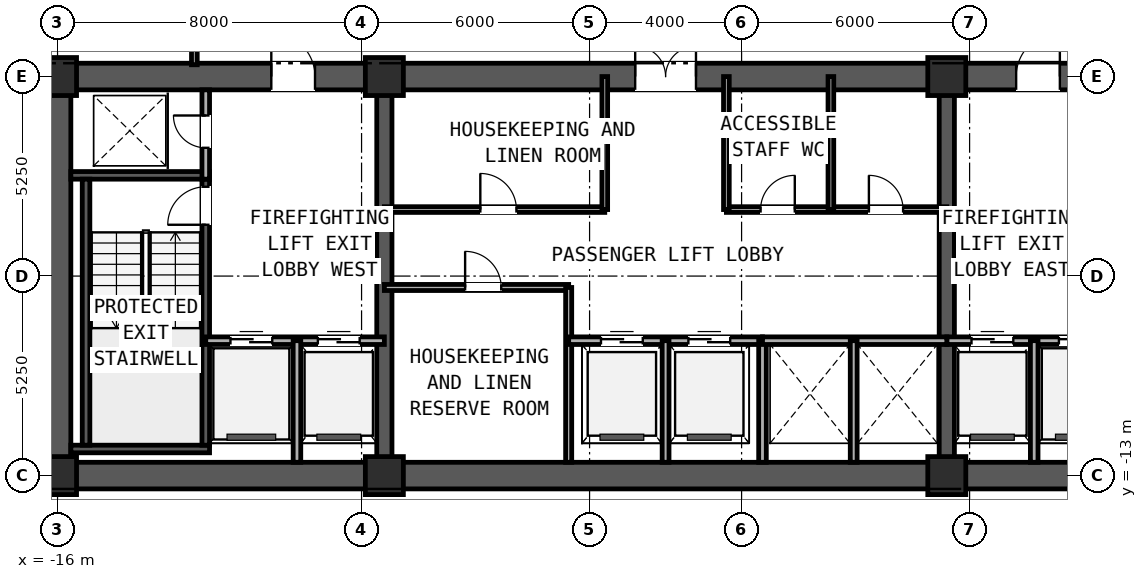
"""IFC4 building model, lengths in metres.
Left out: names, types, materials, properties, quantities, classifications, styles, units other than length and angle.
Written with IfcOpenShell. Run it as: python <this file> out.ifc"""

import sys

from ifc_helpers import new_model, si_unit, direction, frame, frame_2d, origin, origin_2d, place, context, subcontext, project, spatial, rectangle, extrude, element, fill, save


model = new_model("IFC4")
c1 = context("Model", 3, precision=1e-05, world=origin(), true_north=direction((0.0, 1.0)))
c2 = subcontext(c1, "Body", "Model", "MODEL_VIEW")
j1 = project(units=[si_unit("LENGTHUNIT", "METRE"), si_unit("PLANEANGLEUNIT", "RADIAN")], contexts=[c1])
p1 = place(None, origin())
s1 = spatial("IfcSite", under=j1, at=p1, CompositionType="ELEMENT")
p2 = place(p1, origin())
s2 = spatial("IfcBuilding", under=s1, at=p2, CompositionType="ELEMENT")
p3 = place(p2, frame((0.0, 0.0, 139.35)))
s3 = spatial("IfcBuildingStorey", under=s2, at=p3, CompositionType="ELEMENT", Elevation=139.35)
p4 = place(p3, frame((-16.35, -13.0, 0.0), z_axis=(0.0, 0.0, 1.0), x_axis=(1.0, 0.0, 0.0)))
e1 = element("IfcWall", 1, at=p4, inside=s3, PredefinedType="SHEAR", context=c2, shape_type="SweptSolid", body=[
    extrude(rectangle(XDim=32.7, YDim=0.7, at=frame_2d((16.35, 0.0))), origin(), (0.0, 0.0, 1.0), 2.91),
])
p5 = place(p3, frame((-16.35, -2.5, 0.0), z_axis=(0.0, 0.0, 1.0), x_axis=(1.0, 0.0, 0.0)))
e2 = element("IfcWall", 2, at=p5, inside=s3, PredefinedType="SHEAR", context=c2, shape_type="SweptSolid", body=[
    extrude(rectangle(XDim=32.7, YDim=0.7, at=frame_2d((16.35, 0.0))), origin(), (0.0, 0.0, 1.0), 2.91),
])
p6 = place(p5, frame((5.975, 0.0, 0.0)))
e3 = element("IfcOpeningElement", 3, at=p6, cuts=e2, PredefinedType="OPENING", context=c2, shape_type="SweptSolid", body=[
    extrude(rectangle(XDim=1.15, YDim=2.0, at=frame_2d((0.575, 1.0))), frame((0.0, 0.36, 0.0), z_axis=(0.0, -1.0, 0.0), x_axis=(1.0, 0.0, 0.0)), (0.0, 0.0, 1.0), 0.72),
])
p7 = place(p5, frame((15.55, 0.0, 0.0)))
e4 = element("IfcOpeningElement", 4, at=p7, cuts=e2, PredefinedType="OPENING", context=c2, shape_type="SweptSolid", body=[
    extrude(rectangle(XDim=1.6, YDim=2.0, at=frame_2d((0.8, 1.0))), frame((0.0, 0.36, 0.0), z_axis=(0.0, -1.0, 0.0), x_axis=(1.0, 0.0, 0.0)), (0.0, 0.0, 1.0), 0.72),
])
p8 = place(p5, frame((25.575, 0.0, 0.0)))
e5 = element("IfcOpeningElement", 5, at=p8, cuts=e2, PredefinedType="OPENING", context=c2, shape_type="SweptSolid", body=[
    extrude(rectangle(XDim=1.15, YDim=2.0, at=frame_2d((0.575, 1.0))), frame((0.0, 0.36, 0.0), z_axis=(0.0, -1.0, 0.0), x_axis=(1.0, 0.0, 0.0)), (0.0, 0.0, 1.0), 0.72),
])
p9 = place(p3, frame((-16.0, -12.65, 0.0), z_axis=(0.0, 0.0, 1.0), x_axis=(0.0, 1.0, 0.0)))
e6 = element("IfcWall", 6, at=p9, inside=s3, PredefinedType="SHEAR", context=c2, shape_type="SweptSolid", body=[
    extrude(rectangle(XDim=9.8, YDim=0.7, at=frame_2d((4.9, 0.0))), origin(), (0.0, 0.0, 1.0), 2.91),
])
for number, where, z_axis, x_axis in (
    (7, (-7.4, -12.65, 0.0), (0.0, 0.0, 1.0), (0.0, 1.0, 0.0)),
    (8, (7.4, -12.65, 0.0), (0.0, 0.0, 1.0), (0.0, 1.0, 0.0)),
):
    element("IfcWall", number, at=place(p3, frame(where, z_axis=z_axis, x_axis=x_axis)), inside=s3, PredefinedType="SHEAR", context=c2, shape_type="SweptSolid", body=[
        extrude(rectangle(XDim=9.8, YDim=0.4, at=frame_2d((4.9, 0.0))), origin(), (0.0, 0.0, 1.0), 3.19),
    ])
for number, where, z_axis, x_axis in (
    (9, (-15.65, -12.3, 0.0), (0.0, 0.0, 1.0), (1.0, 0.0, 0.0)),
    (10, (-15.65, -5.1, 0.0), (0.0, 0.0, 1.0), (1.0, 0.0, 0.0)),
):
    element("IfcWall", number, at=place(p3, frame(where, z_axis=z_axis, x_axis=x_axis)), inside=s3, PredefinedType="SOLIDWALL", context=c2, shape_type="SweptSolid", body=[
        extrude(rectangle(XDim=3.65, YDim=0.2, at=frame_2d((1.825, 0.0))), origin(), (0.0, 0.0, 1.0), 3.19),
    ])
p10 = place(p3, frame((-15.25, -12.2, 0.0), z_axis=(0.0, 0.0, 1.0), x_axis=(0.0, 1.0, 0.0)))
e11 = element("IfcWall", 11, at=p10, inside=s3, PredefinedType="SOLIDWALL", context=c2, shape_type="SweptSolid", body=[
    extrude(rectangle(XDim=7.0, YDim=0.2, at=frame_2d((3.5, 0.0))), origin(), (0.0, 0.0, 1.0), 3.19),
])
p11 = place(p3, frame((-12.1, -12.2, 0.0), z_axis=(0.0, 0.0, 1.0), x_axis=(0.0, 1.0, 0.0)))
e12 = element("IfcWall", 12, at=p11, inside=s3, PredefinedType="SOLIDWALL", context=c2, shape_type="SweptSolid", body=[
    extrude(rectangle(XDim=7.0, YDim=0.2, at=frame_2d((3.5, 0.0))), origin(), (0.0, 0.0, 1.0), 3.19),
])
p12 = place(p11, frame((5.8, 0.0, 0.0)))
e13 = element("IfcOpeningElement", 13, at=p12, cuts=e12, PredefinedType="OPENING", context=c2, shape_type="SweptSolid", body=[
    extrude(rectangle(XDim=1.0, YDim=2.1, at=frame_2d((0.5, 1.05))), frame((0.0, 0.11, 0.0), z_axis=(0.0, -1.0, 0.0), x_axis=(1.0, 0.0, 0.0)), (0.0, 0.0, 1.0), 0.22),
])
for number, where, z_axis, x_axis in (
    (14, (-16.0, -13.0, 0.0), (0.0, 0.0, 1.0), (1.0, 0.0, 0.0)),
    (15, (-7.4, -13.0, 0.0), (0.0, 0.0, 1.0), (1.0, 0.0, 0.0)),
    (16, (7.4, -13.0, 0.0), (0.0, 0.0, 1.0), (1.0, 0.0, 0.0)),
    (17, (-16.0, -2.5, 0.0), (0.0, 0.0, 1.0), (1.0, 0.0, 0.0)),
    (18, (-7.4, -2.5, 0.0), (0.0, 0.0, 1.0), (1.0, 0.0, 0.0)),
    (19, (7.4, -2.5, 0.0), (0.0, 0.0, 1.0), (1.0, 0.0, 0.0)),
):
    element("IfcColumn", number, at=place(p3, frame(where, z_axis=z_axis, x_axis=x_axis)), inside=s3, PredefinedType="COLUMN", context=c2, shape_type="SweptSolid", body=[
        extrude(rectangle(XDim=1.0, YDim=1.0, at=origin_2d()), origin(), (0.0, 0.0, 1.0), 3.45),
    ])
p13 = place(p3, frame((-26.695, -13.016, 0.0), z_axis=(0.0, 0.0, 1.0), x_axis=(0.995396268366, -0.095845025554, 0.0)))
e20 = element("IfcWall", 20, at=p13, inside=s3, PredefinedType="STANDARD", context=c2, shape_type="SweptSolid", body=[
    extrude(rectangle(XDim=49.6, YDim=0.24, at=frame_2d((24.8, 0.0))), origin(), (0.0, 0.0, 1.0), 3.19),
])
p14 = place(p13, frame((6.044, 0.0, 0.7)))
e21 = element("IfcOpeningElement", 21, at=p14, cuts=e20, PredefinedType="OPENING", context=c2, shape_type="SweptSolid", body=[
    extrude(rectangle(XDim=1.8, YDim=1.5, at=frame_2d((0.9, 0.75))), frame((0.0, 0.13, 0.0), z_axis=(0.0, -1.0, 0.0), x_axis=(1.0, 0.0, 0.0)), (0.0, 0.0, 1.0), 0.26),
])
p15 = place(p13, frame((41.756, 0.0, 0.7)))
e22 = element("IfcOpeningElement", 22, at=p15, cuts=e20, PredefinedType="OPENING", context=c2, shape_type="SweptSolid", body=[
    extrude(rectangle(XDim=1.8, YDim=1.5, at=frame_2d((0.9, 0.75))), frame((0.0, 0.13, 0.0), z_axis=(0.0, -1.0, 0.0), x_axis=(1.0, 0.0, 0.0)), (0.0, 0.0, 1.0), 0.26),
])
p16 = place(p3, frame((-12.1, -5.2, 0.0), z_axis=(0.0, 0.0, 1.0), x_axis=(0.0, 1.0, 0.0)))
e23 = element("IfcWall", 23, at=p16, inside=s3, PredefinedType="PARTITIONING", context=c2, shape_type="SweptSolid", body=[
    extrude(rectangle(XDim=2.35, YDim=0.2, at=frame_2d((1.175, 0.0))), origin(), (0.0, 0.0, 1.0), 2.225),
])
p17 = place(p16, frame((0.825, 0.0, 0.0)))
e24 = element("IfcOpeningElement", 24, at=p17, cuts=e23, PredefinedType="OPENING", context=c2, shape_type="SweptSolid", body=[
    extrude(rectangle(XDim=0.85, YDim=2.05, at=frame_2d((0.425, 1.025))), frame((0.0, 0.11, 0.0), z_axis=(0.0, -1.0, 0.0), x_axis=(1.0, 0.0, 0.0)), (0.0, 0.0, 1.0), 0.22),
])
p18 = place(p3, frame((-12.1, -9.45, 0.0), z_axis=(0.0, 0.0, 1.0), x_axis=(1.0, 0.0, 0.0)))
e25 = element("IfcWall", 25, at=p18, inside=s3, PredefinedType="PARTITIONING", context=c2, shape_type="SweptSolid", body=[
    extrude(rectangle(XDim=4.7, YDim=0.2, at=frame_2d((2.35, 0.0))), origin(), (0.0, 0.0, 1.0), 3.19),
])
p19 = place(p18, frame((0.65, 0.0, 0.0)))
e26 = element("IfcOpeningElement", 26, at=p19, cuts=e25, PredefinedType="OPENING", context=c2, shape_type="SweptSolid", body=[
    extrude(rectangle(XDim=1.1, YDim=2.2, at=frame_2d((0.55, 1.1))), frame((0.0, 0.11, 0.0), z_axis=(0.0, -1.0, 0.0), x_axis=(1.0, 0.0, 0.0)), (0.0, 0.0, 1.0), 0.22),
])
p20 = place(p18, frame((2.95, 0.0, 0.0)))
e27 = element("IfcOpeningElement", 27, at=p20, cuts=e25, PredefinedType="OPENING", context=c2, shape_type="SweptSolid", body=[
    extrude(rectangle(XDim=1.1, YDim=2.2, at=frame_2d((0.55, 1.1))), frame((0.0, 0.11, 0.0), z_axis=(0.0, -1.0, 0.0), x_axis=(1.0, 0.0, 0.0)), (0.0, 0.0, 1.0), 0.22),
])
p21 = place(p3, frame((-9.7, -12.65, 0.0), z_axis=(0.0, 0.0, 1.0), x_axis=(0.0, 1.0, 0.0)))
e28 = element("IfcWall", 28, at=p21, inside=s3, PredefinedType="PARTITIONING", context=c2, shape_type="SweptSolid", body=[
    extrude(rectangle(XDim=3.2, YDim=0.2, at=frame_2d((1.6, 0.0))), origin(), (0.0, 0.0, 1.0), 2.225),
])
p22 = place(p3, frame((7.4, -9.45, 0.0), z_axis=(0.0, 0.0, 1.0), x_axis=(1.0, 0.0, 0.0)))
e29 = element("IfcWall", 29, at=p22, inside=s3, PredefinedType="PARTITIONING", context=c2, shape_type="SweptSolid", body=[
    extrude(rectangle(XDim=4.7, YDim=0.2, at=frame_2d((2.35, 0.0))), origin(), (0.0, 0.0, 1.0), 3.19),
])
p23 = place(p22, frame((2.95, 0.0, 0.0)))
e30 = element("IfcOpeningElement", 30, at=p23, cuts=e29, PredefinedType="OPENING", context=c2, shape_type="SweptSolid", body=[
    extrude(rectangle(XDim=1.1, YDim=2.2, at=frame_2d((0.55, 1.1))), frame((0.0, 0.11, 0.0), z_axis=(0.0, -1.0, 0.0), x_axis=(1.0, 0.0, 0.0)), (0.0, 0.0, 1.0), 0.22),
])
p24 = place(p22, frame((0.65, 0.0, 0.0)))
e31 = element("IfcOpeningElement", 31, at=p24, cuts=e29, PredefinedType="OPENING", context=c2, shape_type="SweptSolid", body=[
    extrude(rectangle(XDim=1.1, YDim=2.2, at=frame_2d((0.55, 1.1))), frame((0.0, 0.11, 0.0), z_axis=(0.0, -1.0, 0.0), x_axis=(1.0, 0.0, 0.0)), (0.0, 0.0, 1.0), 0.22),
])
p25 = place(p3, frame((9.7, -12.65, 0.0), z_axis=(0.0, 0.0, 1.0), x_axis=(0.0, 1.0, 0.0)))
e32 = element("IfcWall", 32, at=p25, inside=s3, PredefinedType="PARTITIONING", context=c2, shape_type="SweptSolid", body=[
    extrude(rectangle(XDim=3.2, YDim=0.2, at=frame_2d((1.6, 0.0))), origin(), (0.0, 0.0, 1.0), 2.225),
])
p26 = place(p3, frame((-7.4, -8.05, 0.0), z_axis=(0.0, 0.0, 1.0), x_axis=(1.0, 0.0, 0.0)))
e33 = element("IfcWall", 33, at=p26, inside=s3, PredefinedType="PARTITIONING", context=c2, shape_type="SweptSolid", body=[
    extrude(rectangle(XDim=4.85, YDim=0.16, at=frame_2d((2.425, 0.0))), origin(), (0.0, 0.0, 1.0), 3.19),
])
p27 = place(p26, frame((2.125, 0.0, 0.0)))
e34 = element("IfcOpeningElement", 34, at=p27, cuts=e33, PredefinedType="OPENING", context=c2, shape_type="SweptSolid", body=[
    extrude(rectangle(XDim=0.95, YDim=2.15, at=frame_2d((0.475, 1.075))), frame((0.0, 0.09, 0.0), z_axis=(0.0, -1.0, 0.0), x_axis=(1.0, 0.0, 0.0)), (0.0, 0.0, 1.0), 0.18),
])
p28 = place(p3, frame((-2.55, -12.65, 0.0), z_axis=(0.0, 0.0, 1.0), x_axis=(0.0, 1.0, 0.0)))
e35 = element("IfcWall", 35, at=p28, inside=s3, PredefinedType="PARTITIONING", context=c2, shape_type="SweptSolid", body=[
    extrude(rectangle(XDim=4.6, YDim=0.16, at=frame_2d((2.3, 0.0))), origin(), (0.0, 0.0, 1.0), 2.225),
])
p29 = place(p3, frame((-2.55, -9.45, 0.0), z_axis=(0.0, 0.0, 1.0), x_axis=(1.0, 0.0, 0.0)))
e36 = element("IfcWall", 36, at=p29, inside=s3, PredefinedType="PARTITIONING", context=c2, shape_type="SweptSolid", body=[
    extrude(rectangle(XDim=5.1, YDim=0.2, at=frame_2d((2.55, 0.0))), origin(), (0.0, 0.0, 1.0), 3.19),
])
p30 = place(p29, frame((0.85, 0.0, 0.0)))
e37 = element("IfcOpeningElement", 37, at=p30, cuts=e36, PredefinedType="OPENING", context=c2, shape_type="SweptSolid", body=[
    extrude(rectangle(XDim=1.1, YDim=2.2, at=frame_2d((0.55, 1.1))), frame((0.0, 0.11, 0.0), z_axis=(0.0, -1.0, 0.0), x_axis=(1.0, 0.0, 0.0)), (0.0, 0.0, 1.0), 0.22),
])
p31 = place(p29, frame((3.15, 0.0, 0.0)))
e38 = element("IfcOpeningElement", 38, at=p31, cuts=e36, PredefinedType="OPENING", context=c2, shape_type="SweptSolid", body=[
    extrude(rectangle(XDim=1.1, YDim=2.2, at=frame_2d((0.55, 1.1))), frame((0.0, 0.11, 0.0), z_axis=(0.0, -1.0, 0.0), x_axis=(1.0, 0.0, 0.0)), (0.0, 0.0, 1.0), 0.22),
])
p32 = place(p3, frame((0.0, -12.65, 0.0), z_axis=(0.0, 0.0, 1.0), x_axis=(0.0, 1.0, 0.0)))
e39 = element("IfcWall", 39, at=p32, inside=s3, PredefinedType="PARTITIONING", context=c2, shape_type="SweptSolid", body=[
    extrude(rectangle(XDim=3.2, YDim=0.18, at=frame_2d((1.6, 0.0))), origin(), (0.0, 0.0, 1.0), 2.225),
])
p33 = place(p3, frame((2.55, -12.65, 0.0), z_axis=(0.0, 0.0, 1.0), x_axis=(0.0, 1.0, 0.0)))
e40 = element("IfcWall", 40, at=p33, inside=s3, PredefinedType="PARTITIONING", context=c2, shape_type="SweptSolid", body=[
    extrude(rectangle(XDim=3.2, YDim=0.2, at=frame_2d((1.6, 0.0))), origin(), (0.0, 0.0, 1.0), 2.225),
])
p34 = place(p3, frame((2.55, -9.45, 0.0), z_axis=(0.0, 0.0, 1.0), x_axis=(1.0, 0.0, 0.0)))
e41 = element("IfcWall", 41, at=p34, inside=s3, PredefinedType="PARTITIONING", context=c2, shape_type="SweptSolid", body=[
    extrude(rectangle(XDim=4.85, YDim=0.2, at=frame_2d((2.425, 0.0))), origin(), (0.0, 0.0, 1.0), 3.19),
])
p35 = place(p3, frame((4.95, -12.65, 0.0), z_axis=(0.0, 0.0, 1.0), x_axis=(0.0, 1.0, 0.0)))
e42 = element("IfcWall", 42, at=p35, inside=s3, PredefinedType="PARTITIONING", context=c2, shape_type="SweptSolid", body=[
    extrude(rectangle(XDim=3.2, YDim=0.18, at=frame_2d((1.6, 0.0))), origin(), (0.0, 0.0, 1.0), 2.225),
])
p36 = place(p3, frame((-7.4, -6.0, 0.0), z_axis=(0.0, 0.0, 1.0), x_axis=(1.0, 0.0, 0.0)))
e43 = element("IfcWall", 43, at=p36, inside=s3, PredefinedType="PARTITIONING", context=c2, shape_type="SweptSolid", body=[
    extrude(rectangle(XDim=5.8, YDim=0.15, at=frame_2d((2.9, 0.0))), origin(), (0.0, 0.0, 1.0), 3.19),
])
p37 = place(p36, frame((2.525, 0.0, 0.0)))
e44 = element("IfcOpeningElement", 44, at=p37, cuts=e43, PredefinedType="OPENING", context=c2, shape_type="SweptSolid", body=[
    extrude(rectangle(XDim=0.95, YDim=2.15, at=frame_2d((0.475, 1.075))), frame((0.0, 0.085, 0.0), z_axis=(0.0, -1.0, 0.0), x_axis=(1.0, 0.0, 0.0)), (0.0, 0.0, 1.0), 0.17),
])
p38 = place(p3, frame((-1.6, -6.0, 0.0), z_axis=(0.0, 0.0, 1.0), x_axis=(0.0, 1.0, 0.0)))
e45 = element("IfcWall", 45, at=p38, inside=s3, PredefinedType="PARTITIONING", context=c2, shape_type="SweptSolid", body=[
    extrude(rectangle(XDim=3.5, YDim=0.15, at=frame_2d((1.75, 0.0))), origin(), (0.0, 0.0, 1.0), 2.225),
])
p39 = place(p3, frame((1.6, -6.0, 0.0), z_axis=(0.0, 0.0, 1.0), x_axis=(1.0, 0.0, 0.0)))
e46 = element("IfcWall", 46, at=p39, inside=s3, PredefinedType="PARTITIONING", context=c2, shape_type="SweptSolid", body=[
    extrude(rectangle(XDim=5.8, YDim=0.15, at=frame_2d((2.9, 0.0))), origin(), (0.0, 0.0, 1.0), 3.19),
])
p40 = place(p39, frame((0.9, 0.0, 0.0)))
e47 = element("IfcOpeningElement", 47, at=p40, cuts=e46, PredefinedType="OPENING", context=c2, shape_type="SweptSolid", body=[
    extrude(rectangle(XDim=0.9, YDim=2.1, at=frame_2d((0.45, 1.05))), frame((0.0, 0.085, 0.0), z_axis=(0.0, -1.0, 0.0), x_axis=(1.0, 0.0, 0.0)), (0.0, 0.0, 1.0), 0.17),
])
p41 = place(p39, frame((3.75, 0.0, 0.0)))
e48 = element("IfcOpeningElement", 48, at=p41, cuts=e46, PredefinedType="OPENING", context=c2, shape_type="SweptSolid", body=[
    extrude(rectangle(XDim=0.9, YDim=2.1, at=frame_2d((0.45, 1.05))), frame((0.0, 0.085, 0.0), z_axis=(0.0, -1.0, 0.0), x_axis=(1.0, 0.0, 0.0)), (0.0, 0.0, 1.0), 0.17),
])
for number, where, z_axis, x_axis in (
    (49, (1.6, -6.0, 0.0), (0.0, 0.0, 1.0), (0.0, 1.0, 0.0)),
    (50, (4.35, -6.0, 0.0), (0.0, 0.0, 1.0), (0.0, 1.0, 0.0)),
):
    element("IfcWall", number, at=place(p3, frame(where, z_axis=z_axis, x_axis=x_axis)), inside=s3, PredefinedType="PARTITIONING", context=c2, shape_type="SweptSolid", body=[
        extrude(rectangle(XDim=3.5, YDim=0.15, at=frame_2d((1.75, 0.0))), origin(), (0.0, 0.0, 1.0), 2.225),
    ])
p42 = place(p3, frame((-12.4, -2.19, 0.0), z_axis=(0.0, 0.0, 1.0), x_axis=(0.0, 1.0, 0.0)))
e51 = element("IfcWall", 51, at=p42, inside=s3, PredefinedType="PARTITIONING", context=c2, shape_type="SweptSolid", body=[
    extrude(rectangle(XDim=2.78, YDim=0.15, at=frame_2d((1.39, 0.0))), origin(), (0.0, 0.0, 1.0), 2.225),
])
p43 = place(p12, frame((1.0, 0.0, 0.0), z_axis=(0.0, 0.0, 1.0), x_axis=(-1.0, 0.0, 0.0)))
e52 = element("IfcDoor", 52, at=p43, inside=s3, OperationType="SINGLE_SWING_LEFT", PredefinedType="DOOR", context=c2, shape_type="SweptSolid", body=[
    extrude(rectangle(XDim=1.0, YDim=2.1, at=frame_2d((0.5, 1.05))), frame((0.0, 0.025, 0.0), z_axis=(0.0, -1.0, 0.0), x_axis=(1.0, 0.0, 0.0)), (0.0, 0.0, 1.0), 0.05),
])
fill(e13, e52)
p44 = place(p17, origin())
e53 = element("IfcDoor", 53, at=p44, inside=s3, OperationType="SINGLE_SWING_RIGHT", PredefinedType="DOOR", context=c2, shape_type="SweptSolid", body=[
    extrude(rectangle(XDim=0.85, YDim=2.05, at=frame_2d((0.425, 1.025))), frame((0.0, 0.025, 0.0), z_axis=(0.0, -1.0, 0.0), x_axis=(1.0, 0.0, 0.0)), (0.0, 0.0, 1.0), 0.05),
])
fill(e24, e53)
p45 = place(p19, origin())
e54 = element("IfcDoor", 54, at=p45, inside=s3, OperationType="SLIDING_TO_LEFT", PredefinedType="DOOR", context=c2, shape_type="SweptSolid", body=[
    extrude(rectangle(XDim=1.1, YDim=2.2, at=frame_2d((0.55, 1.1))), frame((0.0, 0.025, 0.0), z_axis=(0.0, -1.0, 0.0), x_axis=(1.0, 0.0, 0.0)), (0.0, 0.0, 1.0), 0.05),
])
fill(e26, e54)
p46 = place(p20, origin())
e55 = element("IfcDoor", 55, at=p46, inside=s3, OperationType="SLIDING_TO_RIGHT", PredefinedType="DOOR", context=c2, shape_type="SweptSolid", body=[
    extrude(rectangle(XDim=1.1, YDim=2.2, at=frame_2d((0.55, 1.1))), frame((0.0, 0.025, 0.0), z_axis=(0.0, -1.0, 0.0), x_axis=(1.0, 0.0, 0.0)), (0.0, 0.0, 1.0), 0.05),
])
fill(e27, e55)
p47 = place(p23, origin())
e56 = element("IfcDoor", 56, at=p47, inside=s3, OperationType="SLIDING_TO_LEFT", PredefinedType="DOOR", context=c2, shape_type="SweptSolid", body=[
    extrude(rectangle(XDim=1.1, YDim=2.2, at=frame_2d((0.55, 1.1))), frame((0.0, 0.025, 0.0), z_axis=(0.0, -1.0, 0.0), x_axis=(1.0, 0.0, 0.0)), (0.0, 0.0, 1.0), 0.05),
])
fill(e30, e56)
p48 = place(p24, origin())
e57 = element("IfcDoor", 57, at=p48, inside=s3, OperationType="SLIDING_TO_RIGHT", PredefinedType="DOOR", context=c2, shape_type="SweptSolid", body=[
    extrude(rectangle(XDim=1.1, YDim=2.2, at=frame_2d((0.55, 1.1))), frame((0.0, 0.025, 0.0), z_axis=(0.0, -1.0, 0.0), x_axis=(1.0, 0.0, 0.0)), (0.0, 0.0, 1.0), 0.05),
])
fill(e31, e57)
p49 = place(p6, origin())
e58 = element("IfcDoor", 58, at=p49, inside=s3, OperationType="SINGLE_SWING_LEFT", PredefinedType="DOOR", context=c2, shape_type="SweptSolid", body=[
    extrude(rectangle(XDim=1.15, YDim=2.0, at=frame_2d((0.575, 1.0))), frame((0.0, 0.025, 0.0), z_axis=(0.0, -1.0, 0.0), x_axis=(1.0, 0.0, 0.0)), (0.0, 0.0, 1.0), 0.05),
])
fill(e3, e58)
p50 = place(p7, origin())
e59 = element("IfcDoor", 59, at=p50, inside=s3, OperationType="DOUBLE_DOOR_SINGLE_SWING", PredefinedType="DOOR", context=c2, shape_type="SweptSolid", body=[
    extrude(rectangle(XDim=1.6, YDim=2.0, at=frame_2d((0.8, 1.0))), frame((0.0, 0.025, 0.0), z_axis=(0.0, -1.0, 0.0), x_axis=(1.0, 0.0, 0.0)), (0.0, 0.0, 1.0), 0.05),
])
fill(e4, e59)
p51 = place(p8, origin())
e60 = element("IfcDoor", 60, at=p51, inside=s3, OperationType="SINGLE_SWING_RIGHT", PredefinedType="DOOR", context=c2, shape_type="SweptSolid", body=[
    extrude(rectangle(XDim=1.15, YDim=2.0, at=frame_2d((0.575, 1.0))), frame((0.0, 0.025, 0.0), z_axis=(0.0, -1.0, 0.0), x_axis=(1.0, 0.0, 0.0)), (0.0, 0.0, 1.0), 0.05),
])
fill(e5, e60)
p52 = place(p27, origin())
e61 = element("IfcDoor", 61, at=p52, inside=s3, OperationType="SINGLE_SWING_LEFT", PredefinedType="DOOR", context=c2, shape_type="SweptSolid", body=[
    extrude(rectangle(XDim=0.95, YDim=2.15, at=frame_2d((0.475, 1.075))), frame((0.0, 0.025, 0.0), z_axis=(0.0, -1.0, 0.0), x_axis=(1.0, 0.0, 0.0)), (0.0, 0.0, 1.0), 0.05),
])
fill(e34, e61)
p53 = place(p30, origin())
e62 = element("IfcDoor", 62, at=p53, inside=s3, OperationType="SLIDING_TO_RIGHT", PredefinedType="DOOR", context=c2, shape_type="SweptSolid", body=[
    extrude(rectangle(XDim=1.1, YDim=2.2, at=frame_2d((0.55, 1.1))), frame((0.0, 0.025, 0.0), z_axis=(0.0, -1.0, 0.0), x_axis=(1.0, 0.0, 0.0)), (0.0, 0.0, 1.0), 0.05),
])
fill(e37, e62)
p54 = place(p31, origin())
e63 = element("IfcDoor", 63, at=p54, inside=s3, OperationType="SLIDING_TO_RIGHT", PredefinedType="DOOR", context=c2, shape_type="SweptSolid", body=[
    extrude(rectangle(XDim=1.1, YDim=2.2, at=frame_2d((0.55, 1.1))), frame((0.0, 0.025, 0.0), z_axis=(0.0, -1.0, 0.0), x_axis=(1.0, 0.0, 0.0)), (0.0, 0.0, 1.0), 0.05),
])
fill(e38, e63)
p55 = place(p37, frame((0.95, 0.0, 0.0), z_axis=(0.0, 0.0, 1.0), x_axis=(-1.0, 0.0, 0.0)))
e64 = element("IfcDoor", 64, at=p55, inside=s3, OperationType="SINGLE_SWING_LEFT", PredefinedType="DOOR", context=c2, shape_type="SweptSolid", body=[
    extrude(rectangle(XDim=0.95, YDim=2.15, at=frame_2d((0.475, 1.075))), frame((0.0, 0.025, 0.0), z_axis=(0.0, -1.0, 0.0), x_axis=(1.0, 0.0, 0.0)), (0.0, 0.0, 1.0), 0.05),
])
fill(e44, e64)
p56 = place(p40, frame((0.9, 0.0, 0.0), z_axis=(0.0, 0.0, 1.0), x_axis=(-1.0, 0.0, 0.0)))
e65 = element("IfcDoor", 65, at=p56, inside=s3, OperationType="SINGLE_SWING_RIGHT", PredefinedType="DOOR", context=c2, shape_type="SweptSolid", body=[
    extrude(rectangle(XDim=0.9, YDim=2.1, at=frame_2d((0.45, 1.05))), frame((0.0, 0.025, 0.0), z_axis=(0.0, -1.0, 0.0), x_axis=(1.0, 0.0, 0.0)), (0.0, 0.0, 1.0), 0.05),
])
fill(e47, e65)
p57 = place(p41, frame((0.9, 0.0, 0.0), z_axis=(0.0, 0.0, 1.0), x_axis=(-1.0, 0.0, 0.0)))
e66 = element("IfcDoor", 66, at=p57, inside=s3, OperationType="SINGLE_SWING_LEFT", PredefinedType="DOOR", context=c2, shape_type="SweptSolid", body=[
    extrude(rectangle(XDim=0.9, YDim=2.1, at=frame_2d((0.45, 1.05))), frame((0.0, 0.025, 0.0), z_axis=(0.0, -1.0, 0.0), x_axis=(1.0, 0.0, 0.0)), (0.0, 0.0, 1.0), 0.05),
])
fill(e48, e66)
save(model, sys.argv[1])
